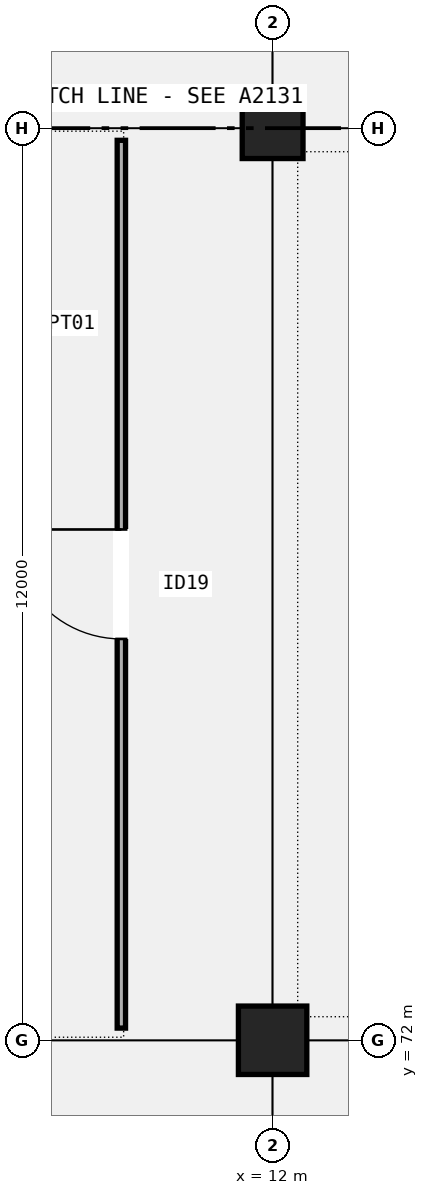
"""IFC4 building model, lengths in metres.
Left out: names, types, materials, properties, quantities, classifications, styles, units other than length and angle.
Written with IfcOpenShell. Run it as: python <this file> out.ifc"""

import sys

from ifc_helpers import new_model, si_unit, direction, frame, frame_2d, origin, origin_2d, place, context, subcontext, project, spatial, rectangle, extrude, element, fill, save


model = new_model("IFC4")
c1 = context("Model", 3, precision=1e-05, world=origin(), true_north=direction((0.0, 1.0)))
c2 = subcontext(c1, "Body", "Model", "MODEL_VIEW")
j1 = project(units=[si_unit("LENGTHUNIT", "METRE"), si_unit("PLANEANGLEUNIT", "RADIAN")], contexts=[c1])
p1 = place(None, origin())
s1 = spatial("IfcSite", under=j1, at=p1, CompositionType="ELEMENT")
p2 = place(p1, origin())
s2 = spatial("IfcBuilding", under=s1, at=p2, CompositionType="ELEMENT")
p3 = place(p2, frame((0.0, 0.0, 5.4)))
s3 = spatial("IfcBuildingStorey", under=s2, at=p3, CompositionType="ELEMENT", Elevation=5.4)
p4 = place(p3, frame((12.0, 72.0, 0.0), z_axis=(0.0, 0.0, 1.0), x_axis=(1.0, 0.0, 0.0)))
e1 = element("IfcColumn", 1, at=p4, inside=s3, PredefinedType="COLUMN", context=c2, shape_type="SweptSolid", body=[
    extrude(rectangle(XDim=0.9, YDim=0.9, at=origin_2d()), origin(), (0.0, 0.0, 1.0), 4.8),
])
p5 = place(p3, frame((12.0, 84.0, 0.0), z_axis=(0.0, 0.0, 1.0), x_axis=(1.0, 0.0, 0.0)))
e2 = element("IfcColumn", 2, at=p5, inside=s3, PredefinedType="COLUMN", context=c2, shape_type="SweptSolid", body=[
    extrude(rectangle(XDim=0.8, YDim=0.8, at=origin_2d()), origin(), (0.0, 0.0, 1.0), 4.8),
])
p6 = place(p3, frame((10.01, 72.16, 0.0), z_axis=(0.0, 0.0, 1.0), x_axis=(0.0, 1.0, 0.0)))
e3 = element("IfcWall", 3, at=p6, inside=s3, PredefinedType="PARTITIONING", context=c2, shape_type="SweptSolid", body=[
    extrude(rectangle(XDim=11.68, YDim=0.11, at=frame_2d((5.84, 0.0))), origin(), (0.0, 0.0, 1.0), 3.92),
])
p7 = place(p6, frame((5.12, 0.0, 0.0)))
e4 = element("IfcOpeningElement", 4, at=p7, cuts=e3, PredefinedType="OPENING", context=c2, shape_type="SweptSolid", body=[
    extrude(rectangle(XDim=1.44, YDim=2.26, at=frame_2d((0.72, 1.13))), frame((0.0, 0.065, 0.0), z_axis=(0.0, -1.0, 0.0), x_axis=(1.0, 0.0, 0.0)), (0.0, 0.0, 1.0), 0.13),
])
p8 = place(p7, origin())
e5 = element("IfcDoor", 5, at=p8, inside=s3, OperationType="SINGLE_SWING_RIGHT", PredefinedType="DOOR", context=c2, shape_type="SweptSolid", body=[
    extrude(rectangle(XDim=1.44, YDim=2.26, at=frame_2d((0.72, 1.13))), frame((0.0, 0.025, 0.0), z_axis=(0.0, -1.0, 0.0), x_axis=(1.0, 0.0, 0.0)), (0.0, 0.0, 1.0), 0.05),
])
fill(e4, e5)
save(model, sys.argv[1])
